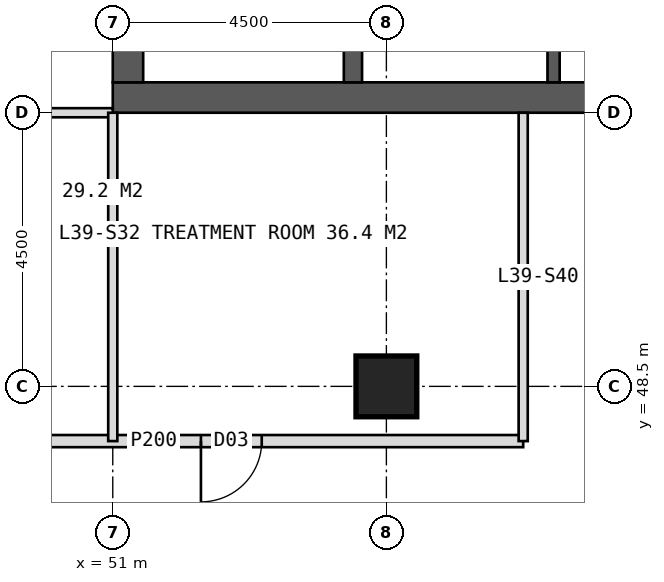
"""IFC4 building model, lengths in metres.
Left out: names, types, materials, properties, quantities, classifications, styles, units other than length and angle.
Written with IfcOpenShell. Run it as: python <this file> out.ifc"""

import sys

from ifc_helpers import new_model, si_unit, direction, frame, frame_2d, origin, origin_2d, place, context, subcontext, project, spatial, rectangle, hollow_rectangle, extrude, element, fill, save


model = new_model("IFC4")
c1 = context("Model", 3, precision=1e-05, world=origin(), true_north=direction((0.0, 1.0)))
c2 = subcontext(c1, "Body", "Model", "MODEL_VIEW")
j1 = project(units=[si_unit("LENGTHUNIT", "METRE"), si_unit("PLANEANGLEUNIT", "RADIAN")], contexts=[c1])
p1 = place(None, origin())
s1 = spatial("IfcSite", under=j1, at=p1, CompositionType="ELEMENT")
p2 = place(p1, origin())
s2 = spatial("IfcBuilding", under=s1, at=p2, CompositionType="ELEMENT")
p3 = place(p2, frame((0.0, 0.0, 164.0)))
s3 = spatial("IfcBuildingStorey", under=s2, at=p3, CompositionType="ELEMENT", Elevation=164.0)
p4 = place(p3, frame((51.0, 53.25, 0.0), z_axis=(0.0, 0.0, 1.0), x_axis=(1.0, 0.0, 0.0)))
e1 = element("IfcWall", 1, at=p4, inside=s3, PredefinedType="SHEAR", context=c2, shape_type="SweptSolid", body=[
    extrude(rectangle(XDim=18.0, YDim=0.5, at=frame_2d((9.0, 0.0))), origin(), (0.0, 0.0, 1.0), 4.0),
])
p5 = place(p4, frame((8.1, 0.0, 0.0)))
e2 = element("IfcOpeningElement", 2, at=p5, cuts=e1, PredefinedType="OPENING", context=c2, shape_type="SweptSolid", body=[
    extrude(rectangle(XDim=1.8, YDim=2.2, at=frame_2d((0.9, 1.1))), frame((0.0, 0.26, 0.0), z_axis=(0.0, -1.0, 0.0), x_axis=(1.0, 0.0, 0.0)), (0.0, 0.0, 1.0), 0.52),
])
p6 = place(p3, frame((51.25, 53.5, 0.0), z_axis=(0.0, 0.0, 1.0), x_axis=(0.0, 1.0, 0.0)))
e3 = element("IfcWall", 3, at=p6, inside=s3, PredefinedType="SHEAR", context=c2, shape_type="SweptSolid", body=[
    extrude(rectangle(XDim=17.0, YDim=0.5, at=frame_2d((8.5, 0.0))), origin(), (0.0, 0.0, 1.0), 4.0),
])
p7 = place(p6, frame((6.0, 0.0, 0.0)))
e4 = element("IfcOpeningElement", 4, at=p7, cuts=e3, PredefinedType="OPENING", context=c2, shape_type="SweptSolid", body=[
    extrude(rectangle(XDim=1.5, YDim=2.2, at=frame_2d((0.75, 1.1))), frame((0.0, 0.26, 0.0), z_axis=(0.0, -1.0, 0.0), x_axis=(1.0, 0.0, 0.0)), (0.0, 0.0, 1.0), 0.52),
])
p8 = place(p3, frame((54.95, 53.5, 0.0), z_axis=(0.0, 0.0, 1.0), x_axis=(0.0, 1.0, 0.0)))
e5 = element("IfcWall", 5, at=p8, inside=s3, PredefinedType="SHEAR", context=c2, shape_type="SweptSolid", body=[
    extrude(rectangle(XDim=17.0, YDim=0.3, at=frame_2d((8.5, 0.0))), origin(), (0.0, 0.0, 1.0), 4.0),
])
p9 = place(p3, frame((58.25, 53.5, 0.0), z_axis=(0.0, 0.0, 1.0), x_axis=(0.0, 1.0, 0.0)))
e6 = element("IfcWall", 6, at=p9, inside=s3, PredefinedType="SHEAR", context=c2, shape_type="SweptSolid", body=[
    extrude(rectangle(XDim=17.0, YDim=0.2, at=frame_2d((8.5, 0.0))), origin(), (0.0, 0.0, 1.0), 4.0),
])
p10 = place(p9, frame((1.375, 0.0, 0.0)))
e7 = element("IfcOpeningElement", 7, at=p10, cuts=e6, PredefinedType="OPENING", context=c2, shape_type="SweptSolid", body=[
    extrude(rectangle(XDim=1.4, YDim=2.2, at=frame_2d((0.7, 1.1))), frame((0.0, 0.11, 0.0), z_axis=(0.0, -1.0, 0.0), x_axis=(1.0, 0.0, 0.0)), (0.0, 0.0, 1.0), 0.22),
])
p11 = place(p9, frame((5.675, 0.0, 0.0)))
e8 = element("IfcOpeningElement", 8, at=p11, cuts=e6, PredefinedType="OPENING", context=c2, shape_type="SweptSolid", body=[
    extrude(rectangle(XDim=1.4, YDim=2.2, at=frame_2d((0.7, 1.1))), frame((0.0, 0.11, 0.0), z_axis=(0.0, -1.0, 0.0), x_axis=(1.0, 0.0, 0.0)), (0.0, 0.0, 1.0), 0.22),
])
p12 = place(p3, frame((55.5, 48.5, 0.0), z_axis=(0.0, 0.0, 1.0), x_axis=(1.0, 0.0, 0.0)))
e9 = element("IfcColumn", 9, at=p12, inside=s3, PredefinedType="COLUMN", context=c2, shape_type="SweptSolid", body=[
    extrude(hollow_rectangle(XDim=1.0, YDim=1.0, WallThickness=0.1, at=origin_2d()), origin(), (0.0, 0.0, 1.0), 4.0),
])
p13 = place(p3, frame((51.0, 53.0, 0.0), z_axis=(0.0, 0.0, 1.0), x_axis=(-1.0, 0.0, 0.0)))
e10 = element("IfcWall", 10, at=p13, inside=s3, PredefinedType="PARTITIONING", context=c2, shape_type="SweptSolid", body=[
    extrude(rectangle(XDim=5.4, YDim=0.15, at=frame_2d((2.7, 0.0))), origin(), (0.0, 0.0, 1.0), 3.75),
])
p14 = place(p3, frame((57.75, 47.6, 0.0), z_axis=(0.0, 0.0, 1.0), x_axis=(-1.0, 0.0, 0.0)))
e11 = element("IfcWall", 11, at=p14, inside=s3, PredefinedType="PARTITIONING", context=c2, shape_type="SweptSolid", body=[
    extrude(rectangle(XDim=12.15, YDim=0.2, at=frame_2d((6.075, 0.0))), origin(), (0.0, 0.0, 1.0), 3.75),
])
p15 = place(p14, frame((4.3, 0.0, 0.0)))
e12 = element("IfcOpeningElement", 12, at=p15, cuts=e11, PredefinedType="OPENING", context=c2, shape_type="SweptSolid", body=[
    extrude(rectangle(XDim=1.0, YDim=2.1, at=frame_2d((0.5, 1.05))), frame((0.0, 0.11, 0.0), z_axis=(0.0, -1.0, 0.0), x_axis=(1.0, 0.0, 0.0)), (0.0, 0.0, 1.0), 0.22),
])
p16 = place(p14, frame((8.95, 0.0, 0.0)))
e13 = element("IfcOpeningElement", 13, at=p16, cuts=e11, PredefinedType="OPENING", context=c2, shape_type="SweptSolid", body=[
    extrude(rectangle(XDim=1.0, YDim=2.1, at=frame_2d((0.5, 1.05))), frame((0.0, 0.11, 0.0), z_axis=(0.0, -1.0, 0.0), x_axis=(1.0, 0.0, 0.0)), (0.0, 0.0, 1.0), 0.22),
])
for number, where, z_axis, x_axis in (
    (14, (57.75, 53.0, 0.0), (0.0, 0.0, 1.0), (0.0, -1.0, 0.0)),
    (15, (51.0, 53.0, 0.0), (0.0, 0.0, 1.0), (0.0, -1.0, 0.0)),
):
    element("IfcWall", number, at=place(p3, frame(where, z_axis=z_axis, x_axis=x_axis)), inside=s3, PredefinedType="PARTITIONING", context=c2, shape_type="SweptSolid", body=[
        extrude(rectangle(XDim=5.4, YDim=0.15, at=frame_2d((2.7, 0.0))), origin(), (0.0, 0.0, 1.0), 3.75),
    ])
p17 = place(p15, origin())
e16 = element("IfcDoor", 16, at=p17, inside=s3, OperationType="SINGLE_SWING_RIGHT", PredefinedType="DOOR", context=c2, shape_type="SweptSolid", body=[
    extrude(rectangle(XDim=1.0, YDim=2.1, at=frame_2d((0.5, 1.05))), frame((0.0, 0.025, 0.0), z_axis=(0.0, -1.0, 0.0), x_axis=(1.0, 0.0, 0.0)), (0.0, 0.0, 1.0), 0.05),
])
fill(e12, e16)
save(model, sys.argv[1])
